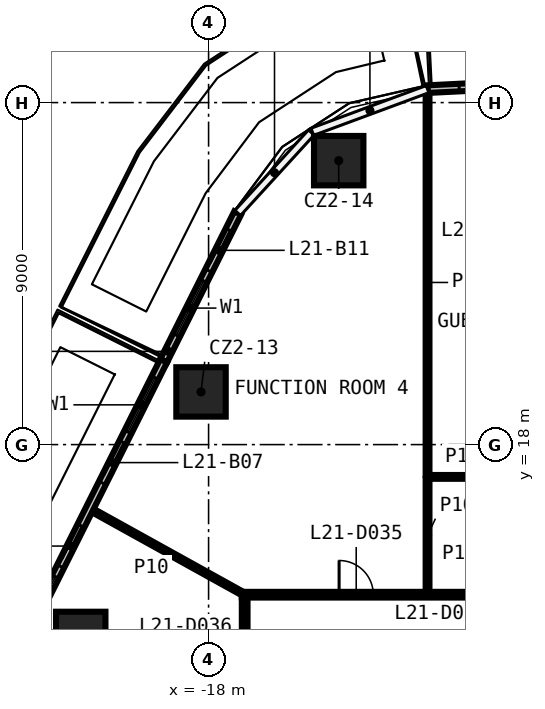
"""IFC4 building model, lengths in metres.
Left out: names, types, materials, properties, quantities, classifications, styles, units other than length and angle.
Written with IfcOpenShell. Run it as: python <this file> out.ifc"""

import sys

from ifc_helpers import new_model, si_unit, direction, frame, frame_2d, origin, origin_2d, place, context, subcontext, project, spatial, rectangle, extrude, element, fill, save


model = new_model("IFC4")
c1 = context("Model", 3, precision=1e-05, world=origin(), true_north=direction((0.0, 1.0)))
c2 = subcontext(c1, "Body", "Model", "MODEL_VIEW")
j1 = project(units=[si_unit("LENGTHUNIT", "METRE"), si_unit("PLANEANGLEUNIT", "RADIAN")], contexts=[c1])
p1 = place(None, origin())
s1 = spatial("IfcSite", under=j1, at=p1, CompositionType="ELEMENT")
p2 = place(p1, origin())
s2 = spatial("IfcBuilding", under=s1, at=p2, CompositionType="ELEMENT")
p3 = place(p2, frame((0.0, 0.0, 102.6)))
s3 = spatial("IfcBuildingStorey", under=s2, at=p3, CompositionType="ELEMENT", Elevation=102.6)
for number, where, z_axis, x_axis in (
    (1, (-21.364, 12.952, 0.0), (0.0, 0.0, 1.0), (1.0, 0.0, 0.0)),
    (2, (-18.199, 19.386, 0.0), (0.0, 0.0, 1.0), (1.0, 0.0, 0.0)),
    (3, (-14.576, 25.472, 0.0), (0.0, 0.0, 1.0), (1.0, 0.0, 0.0)),
):
    element("IfcColumn", number, at=place(p3, frame(where, z_axis=z_axis, x_axis=x_axis)), inside=s3, PredefinedType="COLUMN", context=c2, shape_type="SweptSolid", body=[
        extrude(rectangle(XDim=1.3, YDim=1.3, at=origin_2d()), origin(), (0.0, 0.0, 1.0), 3.3),
    ])
p4 = place(p3, frame((-17.125, 14.05, 0.0), z_axis=(0.0, 0.0, 1.0), x_axis=(1.0, 0.0, 0.0)))
e4 = element("IfcWall", 4, at=p4, inside=s3, PredefinedType="PARTITIONING", context=c2, shape_type="SweptSolid", body=[
    extrude(rectangle(XDim=34.25, YDim=0.15, at=frame_2d((17.125, 0.0))), origin(), (0.0, 0.0, 1.0), 3.3),
])
p5 = place(p4, frame((29.757, 0.0, 0.0)))
e5 = element("IfcOpeningElement", 5, at=p5, cuts=e4, PredefinedType="OPENING", context=c2, shape_type="SweptSolid", body=[
    extrude(rectangle(XDim=1.0, YDim=2.1, at=frame_2d((0.5, 1.05))), frame((0.0, 0.085, 0.0), z_axis=(0.0, -1.0, 0.0), x_axis=(1.0, 0.0, 0.0)), (0.0, 0.0, 1.0), 0.17),
])
p6 = place(p4, frame((18.682, 0.0, 0.0)))
e6 = element("IfcOpeningElement", 6, at=p6, cuts=e4, PredefinedType="OPENING", context=c2, shape_type="SweptSolid", body=[
    extrude(rectangle(XDim=1.0, YDim=2.1, at=frame_2d((0.5, 1.05))), frame((0.0, 0.085, 0.0), z_axis=(0.0, -1.0, 0.0), x_axis=(1.0, 0.0, 0.0)), (0.0, 0.0, 1.0), 0.17),
])
p7 = place(p4, frame((16.654, 0.0, 0.0)))
e7 = element("IfcOpeningElement", 7, at=p7, cuts=e4, PredefinedType="OPENING", context=c2, shape_type="SweptSolid", body=[
    extrude(rectangle(XDim=1.0, YDim=2.1, at=frame_2d((0.5, 1.05))), frame((0.0, 0.085, 0.0), z_axis=(0.0, -1.0, 0.0), x_axis=(1.0, 0.0, 0.0)), (0.0, 0.0, 1.0), 0.17),
])
p8 = place(p4, frame((9.827, 0.0, 0.0)))
e8 = element("IfcOpeningElement", 8, at=p8, cuts=e4, PredefinedType="OPENING", context=c2, shape_type="SweptSolid", body=[
    extrude(rectangle(XDim=1.0, YDim=2.1, at=frame_2d((0.5, 1.05))), frame((0.0, 0.085, 0.0), z_axis=(0.0, -1.0, 0.0), x_axis=(1.0, 0.0, 0.0)), (0.0, 0.0, 1.0), 0.17),
])
p9 = place(p4, frame((7.8, 0.0, 0.0)))
e9 = element("IfcOpeningElement", 9, at=p9, cuts=e4, PredefinedType="OPENING", context=c2, shape_type="SweptSolid", body=[
    extrude(rectangle(XDim=1.0, YDim=2.1, at=frame_2d((0.5, 1.05))), frame((0.0, 0.085, 0.0), z_axis=(0.0, -1.0, 0.0), x_axis=(1.0, 0.0, 0.0)), (0.0, 0.0, 1.0), 0.17),
])
p10 = place(p4, frame((2.56, 0.0, 0.0)))
e10 = element("IfcOpeningElement", 10, at=p10, cuts=e4, PredefinedType="OPENING", context=c2, shape_type="SweptSolid", body=[
    extrude(rectangle(XDim=0.9, YDim=2.1, at=frame_2d((0.45, 1.05))), frame((0.0, 0.085, 0.0), z_axis=(0.0, -1.0, 0.0), x_axis=(1.0, 0.0, 0.0)), (0.0, 0.0, 1.0), 0.17),
])
p11 = place(p3, frame((-12.238, 17.15, 0.0), z_axis=(0.0, 0.0, 1.0), x_axis=(1.0, 0.0, 0.0)))
e11 = element("IfcWall", 11, at=p11, inside=s3, PredefinedType="PARTITIONING", context=c2, shape_type="SweptSolid", body=[
    extrude(rectangle(XDim=2.45, YDim=0.1, at=frame_2d((1.225, 0.0))), origin(), (0.0, 0.0, 1.0), 3.3),
])
p12 = place(p3, frame((-12.238, 14.125, 0.0), z_axis=(0.0, 0.0, 1.0), x_axis=(0.0, 1.0, 0.0)))
e12 = element("IfcWall", 12, at=p12, inside=s3, PredefinedType="PARTITIONING", context=c2, shape_type="SweptSolid", body=[
    extrude(rectangle(XDim=2.975, YDim=0.1, at=frame_2d((1.488, 0.0))), origin(), (0.0, 0.0, 1.0), 3.3),
])
p13 = place(p3, frame((-12.238, 17.2, 0.0), z_axis=(0.0, 0.0, 1.0), x_axis=(0.0, 1.0, 0.0)))
e13 = element("IfcWall", 13, at=p13, inside=s3, PredefinedType="PARTITIONING", context=c2, shape_type="SweptSolid", body=[
    extrude(rectangle(XDim=10.133, YDim=0.1, at=frame_2d((5.067, 0.0))), origin(), (0.0, 0.0, 1.0), 3.3),
])
p14 = place(p3, frame((-17.05, -13.975, 0.0), z_axis=(0.0, 0.0, 1.0), x_axis=(0.0, 1.0, 0.0)))
e14 = element("IfcWall", 14, at=p14, inside=s3, PredefinedType="PARTITIONING", context=c2, shape_type="SweptSolid", body=[
    extrude(rectangle(XDim=27.95, YDim=0.15, at=frame_2d((13.975, 0.0))), origin(), (0.0, 0.0, 1.0), 3.3),
])
p15 = place(p14, frame((11.195, 0.0, 0.0)))
e15 = element("IfcOpeningElement", 15, at=p15, cuts=e14, PredefinedType="OPENING", context=c2, shape_type="SweptSolid", body=[
    extrude(rectangle(XDim=0.9, YDim=2.1, at=frame_2d((0.45, 1.05))), frame((0.0, 0.085, 0.0), z_axis=(0.0, -1.0, 0.0), x_axis=(1.0, 0.0, 0.0)), (0.0, 0.0, 1.0), 0.17),
])
p16 = place(p14, frame((8.57, 0.0, 0.0)))
e16 = element("IfcOpeningElement", 16, at=p16, cuts=e14, PredefinedType="OPENING", context=c2, shape_type="SweptSolid", body=[
    extrude(rectangle(XDim=0.9, YDim=2.1, at=frame_2d((0.45, 1.05))), frame((0.0, 0.085, 0.0), z_axis=(0.0, -1.0, 0.0), x_axis=(1.0, 0.0, 0.0)), (0.0, 0.0, 1.0), 0.17),
])
p17 = place(p14, frame((1.956, 0.0, 0.0)))
e17 = element("IfcOpeningElement", 17, at=p17, cuts=e14, PredefinedType="OPENING", context=c2, shape_type="SweptSolid", body=[
    extrude(rectangle(XDim=0.9, YDim=2.1, at=frame_2d((0.45, 1.05))), frame((0.0, 0.085, 0.0), z_axis=(0.0, -1.0, 0.0), x_axis=(1.0, 0.0, 0.0)), (0.0, 0.0, 1.0), 0.17),
])
p18 = place(p14, frame((25.181, 0.0, 0.0)))
e18 = element("IfcOpeningElement", 18, at=p18, cuts=e14, PredefinedType="OPENING", context=c2, shape_type="SweptSolid", body=[
    extrude(rectangle(XDim=0.9, YDim=2.1, at=frame_2d((0.45, 1.05))), frame((0.0, 0.085, 0.0), z_axis=(0.0, -1.0, 0.0), x_axis=(1.0, 0.0, 0.0)), (0.0, 0.0, 1.0), 0.17),
])
p19 = place(p14, frame((20.101, 0.0, 0.0)))
e19 = element("IfcOpeningElement", 19, at=p19, cuts=e14, PredefinedType="OPENING", context=c2, shape_type="SweptSolid", body=[
    extrude(rectangle(XDim=0.9, YDim=2.1, at=frame_2d((0.45, 1.05))), frame((0.0, 0.085, 0.0), z_axis=(0.0, -1.0, 0.0), x_axis=(1.0, 0.0, 0.0)), (0.0, 0.0, 1.0), 0.17),
])
p20 = place(p14, frame((16.206, 0.0, 0.0)))
e20 = element("IfcOpeningElement", 20, at=p20, cuts=e14, PredefinedType="OPENING", context=c2, shape_type="SweptSolid", body=[
    extrude(rectangle(XDim=0.9, YDim=2.1, at=frame_2d((0.45, 1.05))), frame((0.0, 0.085, 0.0), z_axis=(0.0, -1.0, 0.0), x_axis=(1.0, 0.0, 0.0)), (0.0, 0.0, 1.0), 0.17),
])
p21 = place(p3, frame((-21.115, 16.303, 0.0), z_axis=(0.0, 0.0, 1.0), x_axis=(0.874615252971, -0.484817655692, 0.0)))
e21 = element("IfcWall", 21, at=p21, inside=s3, PredefinedType="PARTITIONING", context=c2, shape_type="SweptSolid", body=[
    extrude(rectangle(XDim=4.648, YDim=0.1, at=frame_2d((2.324, 0.0))), origin(), (0.0, 0.0, 1.0), 3.3),
])
p22 = place(p3, frame((1.042, 28.012, 0.0), z_axis=(0.0, 0.0, 1.0), x_axis=(-0.998772222794, -0.049538338427, 0.0)))
e22 = element("IfcWall", 22, at=p22, inside=s3, PredefinedType="SOLIDWALL", context=c2, shape_type="SweptSolid", body=[
    extrude(rectangle(XDim=13.297, YDim=0.2, at=frame_2d((6.648, 0.0))), origin(), (0.0, 0.0, 1.0), 3.25),
])
p23 = place(p22, frame((2.0, 0.0, 0.6)))
e23 = element("IfcOpeningElement", 23, at=p23, cuts=e22, PredefinedType="OPENING", context=c2, shape_type="SweptSolid", body=[
    extrude(rectangle(XDim=1.6, YDim=2.4, at=frame_2d((0.8, 1.2))), frame((0.0, 0.11, 0.0), z_axis=(0.0, -1.0, 0.0), x_axis=(1.0, 0.0, 0.0)), (0.0, 0.0, 1.0), 0.22),
])
p24 = place(p22, frame((0.5, 0.0, 0.0)))
e24 = element("IfcOpeningElement", 24, at=p24, cuts=e22, PredefinedType="OPENING", context=c2, shape_type="SweptSolid", body=[
    extrude(rectangle(XDim=1.2, YDim=2.4, at=frame_2d((0.6, 1.2))), frame((0.0, 0.11, 0.0), z_axis=(0.0, -1.0, 0.0), x_axis=(1.0, 0.0, 0.0)), (0.0, 0.0, 1.0), 0.22),
])
p25 = place(p22, frame((6.432, 0.0, 0.6)))
e25 = element("IfcOpeningElement", 25, at=p25, cuts=e22, PredefinedType="OPENING", context=c2, shape_type="SweptSolid", body=[
    extrude(rectangle(XDim=1.6, YDim=2.4, at=frame_2d((0.8, 1.2))), frame((0.0, 0.11, 0.0), z_axis=(0.0, -1.0, 0.0), x_axis=(1.0, 0.0, 0.0)), (0.0, 0.0, 1.0), 0.22),
])
p26 = place(p22, frame((4.932, 0.0, 0.0)))
e26 = element("IfcOpeningElement", 26, at=p26, cuts=e22, PredefinedType="OPENING", context=c2, shape_type="SweptSolid", body=[
    extrude(rectangle(XDim=1.2, YDim=2.4, at=frame_2d((0.6, 1.2))), frame((0.0, 0.11, 0.0), z_axis=(0.0, -1.0, 0.0), x_axis=(1.0, 0.0, 0.0)), (0.0, 0.0, 1.0), 0.22),
])
p27 = place(p22, frame((9.365, 0.0, 0.6)))
e27 = element("IfcOpeningElement", 27, at=p27, cuts=e22, PredefinedType="OPENING", context=c2, shape_type="SweptSolid", body=[
    extrude(rectangle(XDim=1.6, YDim=2.4, at=frame_2d((0.8, 1.2))), frame((0.0, 0.11, 0.0), z_axis=(0.0, -1.0, 0.0), x_axis=(1.0, 0.0, 0.0)), (0.0, 0.0, 1.0), 0.22),
])
p28 = place(p22, frame((11.264, 0.0, 0.0)))
e28 = element("IfcOpeningElement", 28, at=p28, cuts=e22, PredefinedType="OPENING", context=c2, shape_type="SweptSolid", body=[
    extrude(rectangle(XDim=1.2, YDim=2.4, at=frame_2d((0.6, 1.2))), frame((0.0, 0.11, 0.0), z_axis=(0.0, -1.0, 0.0), x_axis=(1.0, 0.0, 0.0)), (0.0, 0.0, 1.0), 0.22),
])
p29 = place(p3, frame((-19.181, 20.208, 0.0), z_axis=(0.0, 0.0, 1.0), x_axis=(-0.447953166305, -0.894057023236, 0.0)))
e29 = element("IfcWall", 29, at=p29, inside=s3, PredefinedType="SOLIDWALL", context=c2, shape_type="SweptSolid", body=[
    extrude(rectangle(XDim=17.426, YDim=0.2, at=frame_2d((8.713, 0.0))), origin(), (0.0, 0.0, 1.0), 3.25),
])
p30 = place(p29, frame((0.5, 0.0, 0.6)))
e30 = element("IfcOpeningElement", 30, at=p30, cuts=e29, PredefinedType="OPENING", context=c2, shape_type="SweptSolid", body=[
    extrude(rectangle(XDim=1.6, YDim=2.4, at=frame_2d((0.8, 1.2))), frame((0.0, 0.11, 0.0), z_axis=(0.0, -1.0, 0.0), x_axis=(1.0, 0.0, 0.0)), (0.0, 0.0, 1.0), 0.22),
])
p31 = place(p29, frame((2.4, 0.0, 0.0)))
e31 = element("IfcOpeningElement", 31, at=p31, cuts=e29, PredefinedType="OPENING", context=c2, shape_type="SweptSolid", body=[
    extrude(rectangle(XDim=1.2, YDim=2.4, at=frame_2d((0.6, 1.2))), frame((0.0, 0.11, 0.0), z_axis=(0.0, -1.0, 0.0), x_axis=(1.0, 0.0, 0.0)), (0.0, 0.0, 1.0), 0.22),
])
p32 = place(p29, frame((6.357, 0.0, 0.6)))
e32 = element("IfcOpeningElement", 32, at=p32, cuts=e29, PredefinedType="OPENING", context=c2, shape_type="SweptSolid", body=[
    extrude(rectangle(XDim=1.6, YDim=2.4, at=frame_2d((0.8, 1.2))), frame((0.0, 0.11, 0.0), z_axis=(0.0, -1.0, 0.0), x_axis=(1.0, 0.0, 0.0)), (0.0, 0.0, 1.0), 0.22),
])
p33 = place(p29, frame((4.857, 0.0, 0.0)))
e33 = element("IfcOpeningElement", 33, at=p33, cuts=e29, PredefinedType="OPENING", context=c2, shape_type="SweptSolid", body=[
    extrude(rectangle(XDim=1.2, YDim=2.4, at=frame_2d((0.6, 1.2))), frame((0.0, 0.11, 0.0), z_axis=(0.0, -1.0, 0.0), x_axis=(1.0, 0.0, 0.0)), (0.0, 0.0, 1.0), 0.22),
])
p34 = place(p29, frame((10.713, 0.0, 0.6)))
e34 = element("IfcOpeningElement", 34, at=p34, cuts=e29, PredefinedType="OPENING", context=c2, shape_type="SweptSolid", body=[
    extrude(rectangle(XDim=1.6, YDim=2.4, at=frame_2d((0.8, 1.2))), frame((0.0, 0.11, 0.0), z_axis=(0.0, -1.0, 0.0), x_axis=(1.0, 0.0, 0.0)), (0.0, 0.0, 1.0), 0.22),
])
p35 = place(p29, frame((9.213, 0.0, 0.0)))
e35 = element("IfcOpeningElement", 35, at=p35, cuts=e29, PredefinedType="OPENING", context=c2, shape_type="SweptSolid", body=[
    extrude(rectangle(XDim=1.2, YDim=2.4, at=frame_2d((0.6, 1.2))), frame((0.0, 0.11, 0.0), z_axis=(0.0, -1.0, 0.0), x_axis=(1.0, 0.0, 0.0)), (0.0, 0.0, 1.0), 0.22),
])
p36 = place(p29, frame((13.57, 0.0, 0.6)))
e36 = element("IfcOpeningElement", 36, at=p36, cuts=e29, PredefinedType="OPENING", context=c2, shape_type="SweptSolid", body=[
    extrude(rectangle(XDim=1.6, YDim=2.4, at=frame_2d((0.8, 1.2))), frame((0.0, 0.11, 0.0), z_axis=(0.0, -1.0, 0.0), x_axis=(1.0, 0.0, 0.0)), (0.0, 0.0, 1.0), 0.22),
])
p37 = place(p29, frame((15.67, 0.0, 0.0)))
e37 = element("IfcOpeningElement", 37, at=p37, cuts=e29, PredefinedType="OPENING", context=c2, shape_type="SweptSolid", body=[
    extrude(rectangle(XDim=1.2, YDim=2.4, at=frame_2d((0.6, 1.2))), frame((0.0, 0.11, 0.0), z_axis=(0.0, -1.0, 0.0), x_axis=(1.0, 0.0, 0.0)), (0.0, 0.0, 1.0), 0.22),
])
p38 = place(p3, frame((-17.233, 24.096, 0.0), z_axis=(0.0, 0.0, 1.0), x_axis=(-0.447977093624, -0.89404503443, 0.0)))
e38 = element("IfcWall", 38, at=p38, inside=s3, PredefinedType="SOLIDWALL", context=c2, shape_type="SweptSolid", body=[
    extrude(rectangle(XDim=4.348, YDim=0.2, at=frame_2d((2.174, 0.0))), origin(), (0.0, 0.0, 1.0), 3.25),
])
p39 = place(p38, frame((2.0, 0.0, 0.6)))
e39 = element("IfcOpeningElement", 39, at=p39, cuts=e38, PredefinedType="OPENING", context=c2, shape_type="SweptSolid", body=[
    extrude(rectangle(XDim=1.6, YDim=2.4, at=frame_2d((0.8, 1.2))), frame((0.0, 0.11, 0.0), z_axis=(0.0, -1.0, 0.0), x_axis=(1.0, 0.0, 0.0)), (0.0, 0.0, 1.0), 0.22),
])
p40 = place(p38, frame((0.5, 0.0, 0.0)))
e40 = element("IfcOpeningElement", 40, at=p40, cuts=e38, PredefinedType="OPENING", context=c2, shape_type="SweptSolid", body=[
    extrude(rectangle(XDim=1.2, YDim=2.4, at=frame_2d((0.6, 1.2))), frame((0.0, 0.11, 0.0), z_axis=(0.0, -1.0, 0.0), x_axis=(1.0, 0.0, 0.0)), (0.0, 0.0, 1.0), 0.22),
])
p41 = place(p10, origin())
e41 = element("IfcDoor", 41, at=p41, inside=s3, OperationType="SINGLE_SWING_RIGHT", PredefinedType="DOOR", context=c2, shape_type="SweptSolid", body=[
    extrude(rectangle(XDim=0.9, YDim=2.1, at=frame_2d((0.45, 1.05))), frame((0.0, 0.025, 0.0), z_axis=(0.0, -1.0, 0.0), x_axis=(1.0, 0.0, 0.0)), (0.0, 0.0, 1.0), 0.05),
])
fill(e10, e41)
p42 = place(p28, origin())
e42 = element("IfcDoor", 42, at=p42, inside=s3, OperationType="SLIDING_TO_LEFT", PredefinedType="DOOR", context=c2, shape_type="SweptSolid", body=[
    extrude(rectangle(XDim=1.2, YDim=2.4, at=frame_2d((0.6, 1.2))), frame((0.0, 0.025, 0.0), z_axis=(0.0, -1.0, 0.0), x_axis=(1.0, 0.0, 0.0)), (0.0, 0.0, 1.0), 0.05),
])
fill(e28, e42)
p43 = place(p30, origin())
e43 = element("IfcWindow", 43, at=p43, inside=s3, PartitioningType="SINGLE_PANEL", PredefinedType="WINDOW", context=c2, shape_type="SweptSolid", body=[
    extrude(rectangle(XDim=1.6, YDim=2.4, at=frame_2d((0.8, 1.2))), frame((0.0, 0.03, 0.0), z_axis=(0.0, -1.0, 0.0), x_axis=(1.0, 0.0, 0.0)), (0.0, 0.0, 1.0), 0.06),
])
fill(e30, e43)
p44 = place(p31, origin())
e44 = element("IfcDoor", 44, at=p44, inside=s3, OperationType="SLIDING_TO_LEFT", PredefinedType="DOOR", context=c2, shape_type="SweptSolid", body=[
    extrude(rectangle(XDim=1.2, YDim=2.4, at=frame_2d((0.6, 1.2))), frame((0.0, 0.025, 0.0), z_axis=(0.0, -1.0, 0.0), x_axis=(1.0, 0.0, 0.0)), (0.0, 0.0, 1.0), 0.05),
])
fill(e31, e44)
p45 = place(p32, origin())
e45 = element("IfcWindow", 45, at=p45, inside=s3, PartitioningType="SINGLE_PANEL", PredefinedType="WINDOW", context=c2, shape_type="SweptSolid", body=[
    extrude(rectangle(XDim=1.6, YDim=2.4, at=frame_2d((0.8, 1.2))), frame((0.0, 0.03, 0.0), z_axis=(0.0, -1.0, 0.0), x_axis=(1.0, 0.0, 0.0)), (0.0, 0.0, 1.0), 0.06),
])
fill(e32, e45)
p46 = place(p33, origin())
e46 = element("IfcDoor", 46, at=p46, inside=s3, OperationType="SLIDING_TO_LEFT", PredefinedType="DOOR", context=c2, shape_type="SweptSolid", body=[
    extrude(rectangle(XDim=1.2, YDim=2.4, at=frame_2d((0.6, 1.2))), frame((0.0, 0.025, 0.0), z_axis=(0.0, -1.0, 0.0), x_axis=(1.0, 0.0, 0.0)), (0.0, 0.0, 1.0), 0.05),
])
fill(e33, e46)
p47 = place(p39, origin())
e47 = element("IfcWindow", 47, at=p47, inside=s3, PartitioningType="SINGLE_PANEL", PredefinedType="WINDOW", context=c2, shape_type="SweptSolid", body=[
    extrude(rectangle(XDim=1.6, YDim=2.4, at=frame_2d((0.8, 1.2))), frame((0.0, 0.03, 0.0), z_axis=(0.0, -1.0, 0.0), x_axis=(1.0, 0.0, 0.0)), (0.0, 0.0, 1.0), 0.06),
])
fill(e39, e47)
p48 = place(p40, origin())
e48 = element("IfcDoor", 48, at=p48, inside=s3, OperationType="SLIDING_TO_LEFT", PredefinedType="DOOR", context=c2, shape_type="SweptSolid", body=[
    extrude(rectangle(XDim=1.2, YDim=2.4, at=frame_2d((0.6, 1.2))), frame((0.0, 0.025, 0.0), z_axis=(0.0, -1.0, 0.0), x_axis=(1.0, 0.0, 0.0)), (0.0, 0.0, 1.0), 0.05),
])
fill(e40, e48)
save(model, sys.argv[1])
